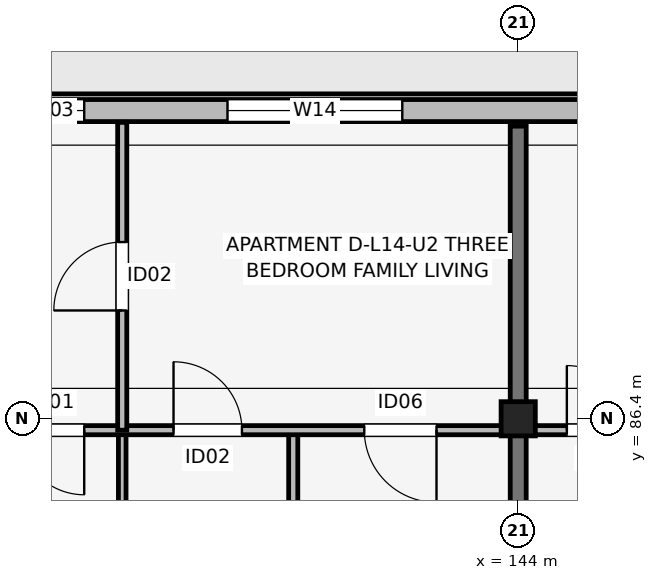
"""IFC4 building model, lengths in metres.
Left out: names, types, materials, properties, quantities, classifications, styles, units other than length and angle.
Written with IfcOpenShell. Run it as: python <this file> out.ifc"""

import sys

from ifc_helpers import new_model, si_unit, direction, frame, frame_2d, origin, origin_2d, place, context, subcontext, project, spatial, rectangle, extrude, element, fill, save


model = new_model("IFC4")
c1 = context("Model", 3, precision=1e-05, world=origin(), true_north=direction((0.0, 1.0)))
c2 = subcontext(c1, "Body", "Model", "MODEL_VIEW")
j1 = project(units=[si_unit("LENGTHUNIT", "METRE"), si_unit("PLANEANGLEUNIT", "RADIAN")], contexts=[c1])
p1 = place(None, origin())
s1 = spatial("IfcSite", under=j1, at=p1, CompositionType="ELEMENT")
p2 = place(p1, origin())
s2 = spatial("IfcBuilding", under=s1, at=p2, CompositionType="ELEMENT")
p3 = place(p2, frame((0.0, 0.0, 46.5)))
s3 = spatial("IfcBuildingStorey", under=s2, at=p3, CompositionType="ELEMENT", Elevation=46.5)
p4 = place(p3, frame((144.0, 86.4, 0.0), z_axis=(0.0, 0.0, 1.0), x_axis=(1.0, 0.0, 0.0)))
e1 = element("IfcColumn", 1, at=p4, inside=s3, PredefinedType="COLUMN", context=c2, shape_type="SweptSolid", body=[
    extrude(rectangle(XDim=0.45, YDim=0.45, at=origin_2d()), origin(), (0.0, 0.0, 1.0), 3.15),
])
p5 = place(p3, frame((144.0, 83.85, 0.0), z_axis=(0.0, 0.0, 1.0), x_axis=(0.0, 1.0, 0.0)))
e2 = element("IfcWall", 2, at=p5, inside=s3, PredefinedType="SHEAR", context=c2, shape_type="SweptSolid", body=[
    extrude(rectangle(XDim=6.4, YDim=0.21, at=frame_2d((3.2, 0.0))), origin(), (0.0, 0.0, 1.0), 3.15),
])
p6 = place(p3, frame((163.6, 90.455, 0.0), z_axis=(0.0, 0.0, 1.0), x_axis=(-1.0, 0.0, 0.0)))
e3 = element("IfcWall", 3, at=p6, inside=s3, PredefinedType="SOLIDWALL", context=c2, shape_type="SweptSolid", body=[
    extrude(rectangle(XDim=32.0, YDim=0.29, at=frame_2d((16.0, 0.0))), origin(), (0.0, 0.0, 1.0), 2.48),
])
p7 = place(p6, frame((15.45, 0.0, 0.0), z_axis=(0.0, 0.0, 1.0), x_axis=(-1.0, 0.0, 0.0)))
e4 = element("IfcOpeningElement", 4, at=p7, cuts=e3, PredefinedType="OPENING", context=c2, shape_type="SweptSolid", body=[
    extrude(rectangle(XDim=2.1, YDim=2.2, at=frame_2d((1.05, 1.1))), frame((0.0, 0.155, 0.0), z_axis=(0.0, -1.0, 0.0), x_axis=(1.0, 0.0, 0.0)), (0.0, 0.0, 1.0), 0.31),
])
p8 = place(p6, frame((29.285, 0.0, 0.7)))
e5 = element("IfcOpeningElement", 5, at=p8, cuts=e3, PredefinedType="OPENING", context=c2, shape_type="SweptSolid", body=[
    extrude(rectangle(XDim=1.86, YDim=1.6, at=frame_2d((0.93, 0.8))), frame((0.0, 0.155, 0.0), z_axis=(0.0, -1.0, 0.0), x_axis=(1.0, 0.0, 0.0)), (0.0, 0.0, 1.0), 0.31),
])
p9 = place(p6, frame((27.405, 0.0, 0.75)))
e6 = element("IfcOpeningElement", 6, at=p9, cuts=e3, PredefinedType="OPENING", context=c2, shape_type="SweptSolid", body=[
    extrude(rectangle(XDim=0.72, YDim=1.35, at=frame_2d((0.36, 0.675))), frame((0.0, 0.155, 0.0), z_axis=(0.0, -1.0, 0.0), x_axis=(1.0, 0.0, 0.0)), (0.0, 0.0, 1.0), 0.31),
])
p10 = place(p6, frame((25.31, 0.0, 0.75)))
e7 = element("IfcOpeningElement", 7, at=p10, cuts=e3, PredefinedType="OPENING", context=c2, shape_type="SweptSolid", body=[
    extrude(rectangle(XDim=0.85, YDim=1.4, at=frame_2d((0.425, 0.7))), frame((0.0, 0.155, 0.0), z_axis=(0.0, -1.0, 0.0), x_axis=(1.0, 0.0, 0.0)), (0.0, 0.0, 1.0), 0.31),
])
p11 = place(p6, frame((21.125, 0.0, 0.7)))
e8 = element("IfcOpeningElement", 8, at=p11, cuts=e3, PredefinedType="OPENING", context=c2, shape_type="SweptSolid", body=[
    extrude(rectangle(XDim=2.3, YDim=1.65, at=frame_2d((1.15, 0.825))), frame((0.0, 0.155, 0.0), z_axis=(0.0, -1.0, 0.0), x_axis=(1.0, 0.0, 0.0)), (0.0, 0.0, 1.0), 0.31),
])
p12 = place(p6, frame((16.335, 0.0, 0.7)))
e9 = element("IfcOpeningElement", 9, at=p12, cuts=e3, PredefinedType="OPENING", context=c2, shape_type="SweptSolid", body=[
    extrude(rectangle(XDim=2.45, YDim=1.65, at=frame_2d((1.225, 0.825))), frame((0.0, 0.155, 0.0), z_axis=(0.0, -1.0, 0.0), x_axis=(1.0, 0.0, 0.0)), (0.0, 0.0, 1.0), 0.31),
])
p13 = place(p6, frame((10.725, 0.0, 0.75)))
e10 = element("IfcOpeningElement", 10, at=p13, cuts=e3, PredefinedType="OPENING", context=c2, shape_type="SweptSolid", body=[
    extrude(rectangle(XDim=1.22, YDim=1.5, at=frame_2d((0.61, 0.75))), frame((0.0, 0.155, 0.0), z_axis=(0.0, -1.0, 0.0), x_axis=(1.0, 0.0, 0.0)), (0.0, 0.0, 1.0), 0.31),
])
p14 = place(p6, frame((7.015, 0.0, 0.7)))
e11 = element("IfcOpeningElement", 11, at=p14, cuts=e3, PredefinedType="OPENING", context=c2, shape_type="SweptSolid", body=[
    extrude(rectangle(XDim=1.72, YDim=1.6, at=frame_2d((0.86, 0.8))), frame((0.0, 0.155, 0.0), z_axis=(0.0, -1.0, 0.0), x_axis=(1.0, 0.0, 0.0)), (0.0, 0.0, 1.0), 0.31),
])
p15 = place(p6, frame((3.375, 0.0, 0.75)))
e12 = element("IfcOpeningElement", 12, at=p15, cuts=e3, PredefinedType="OPENING", context=c2, shape_type="SweptSolid", body=[
    extrude(rectangle(XDim=1.46, YDim=1.55, at=frame_2d((0.73, 0.775))), frame((0.0, 0.155, 0.0), z_axis=(0.0, -1.0, 0.0), x_axis=(1.0, 0.0, 0.0)), (0.0, 0.0, 1.0), 0.31),
])
p16 = place(p6, frame((1.355, 0.0, 0.75)))
e13 = element("IfcOpeningElement", 13, at=p16, cuts=e3, PredefinedType="OPENING", context=c2, shape_type="SweptSolid", body=[
    extrude(rectangle(XDim=0.6, YDim=1.25, at=frame_2d((0.3, 0.625))), frame((0.0, 0.155, 0.0), z_axis=(0.0, -1.0, 0.0), x_axis=(1.0, 0.0, 0.0)), (0.0, 0.0, 1.0), 0.31),
])
p17 = place(p3, frame((138.79, 83.7, 0.0), z_axis=(0.0, 0.0, 1.0), x_axis=(0.0, 1.0, 0.0)))
e14 = element("IfcWall", 14, at=p17, inside=s3, PredefinedType="PARTITIONING", context=c2, shape_type="SweptSolid", body=[
    extrude(rectangle(XDim=2.55, YDim=0.1, at=frame_2d((1.275, 0.0))), origin(), (0.0, 0.0, 1.0), 2.38),
])
p18 = place(p3, frame((141.04, 83.7, 0.0), z_axis=(0.0, 0.0, 1.0), x_axis=(0.0, 1.0, 0.0)))
e15 = element("IfcWall", 15, at=p18, inside=s3, PredefinedType="PARTITIONING", context=c2, shape_type="SweptSolid", body=[
    extrude(rectangle(XDim=2.55, YDim=0.12, at=frame_2d((1.275, 0.0))), origin(), (0.0, 0.0, 1.0), 2.38),
])
p19 = place(p3, frame((136.94, 86.25, 0.0), z_axis=(0.0, 0.0, 1.0), x_axis=(1.0, 0.0, 0.0)))
e16 = element("IfcWall", 16, at=p19, inside=s3, PredefinedType="PARTITIONING", context=c2, shape_type="SweptSolid", body=[
    extrude(rectangle(XDim=6.92, YDim=0.12, at=frame_2d((3.46, 0.0))), origin(), (0.0, 0.0, 1.0), 2.38),
])
p20 = place(p19, frame((1.35, 0.0, 0.0), z_axis=(0.0, 0.0, 1.0), x_axis=(-1.0, 0.0, 0.0)))
e17 = element("IfcOpeningElement", 17, at=p20, cuts=e16, PredefinedType="OPENING", context=c2, shape_type="SweptSolid", body=[
    extrude(rectangle(XDim=0.85, YDim=2.08, at=frame_2d((0.425, 1.04))), frame((0.0, 0.07, 0.0), z_axis=(0.0, -1.0, 0.0), x_axis=(1.0, 0.0, 0.0)), (0.0, 0.0, 1.0), 0.14),
])
p21 = place(p19, frame((2.525, 0.0, 0.0)))
e18 = element("IfcOpeningElement", 18, at=p21, cuts=e16, PredefinedType="OPENING", context=c2, shape_type="SweptSolid", body=[
    extrude(rectangle(XDim=0.9, YDim=2.08, at=frame_2d((0.45, 1.04))), frame((0.0, 0.07, 0.0), z_axis=(0.0, -1.0, 0.0), x_axis=(1.0, 0.0, 0.0)), (0.0, 0.0, 1.0), 0.14),
])
p22 = place(p19, frame((5.985, 0.0, 0.0), z_axis=(0.0, 0.0, 1.0), x_axis=(-1.0, 0.0, 0.0)))
e19 = element("IfcOpeningElement", 19, at=p22, cuts=e16, PredefinedType="OPENING", context=c2, shape_type="SweptSolid", body=[
    extrude(rectangle(XDim=0.95, YDim=2.08, at=frame_2d((0.475, 1.04))), frame((0.0, 0.07, 0.0), z_axis=(0.0, -1.0, 0.0), x_axis=(1.0, 0.0, 0.0)), (0.0, 0.0, 1.0), 0.14),
])
p23 = place(p3, frame((138.79, 86.25, 0.0), z_axis=(0.0, 0.0, 1.0), x_axis=(0.0, 1.0, 0.0)))
e20 = element("IfcWall", 20, at=p23, inside=s3, PredefinedType="PARTITIONING", context=c2, shape_type="SweptSolid", body=[
    extrude(rectangle(XDim=4.05, YDim=0.12, at=frame_2d((2.025, 0.0))), origin(), (0.0, 0.0, 1.0), 2.38),
])
p24 = place(p23, frame((1.575, 0.0, 0.0)))
e21 = element("IfcOpeningElement", 21, at=p24, cuts=e20, PredefinedType="OPENING", context=c2, shape_type="SweptSolid", body=[
    extrude(rectangle(XDim=0.9, YDim=2.08, at=frame_2d((0.45, 1.04))), frame((0.0, 0.07, 0.0), z_axis=(0.0, -1.0, 0.0), x_axis=(1.0, 0.0, 0.0)), (0.0, 0.0, 1.0), 0.14),
])
p25 = place(p3, frame((144.14, 86.25, 0.0), z_axis=(0.0, 0.0, 1.0), x_axis=(1.0, 0.0, 0.0)))
e22 = element("IfcWall", 22, at=p25, inside=s3, PredefinedType="PARTITIONING", context=c2, shape_type="SweptSolid", body=[
    extrude(rectangle(XDim=6.92, YDim=0.12, at=frame_2d((3.46, 0.0))), origin(), (0.0, 0.0, 1.0), 2.38),
])
p26 = place(p25, frame((0.5, 0.0, 0.0)))
e23 = element("IfcOpeningElement", 23, at=p26, cuts=e22, PredefinedType="OPENING", context=c2, shape_type="SweptSolid", body=[
    extrude(rectangle(XDim=0.85, YDim=2.08, at=frame_2d((0.425, 1.04))), frame((0.0, 0.07, 0.0), z_axis=(0.0, -1.0, 0.0), x_axis=(1.0, 0.0, 0.0)), (0.0, 0.0, 1.0), 0.14),
])
p27 = place(p25, frame((3.275, 0.0, 0.0), z_axis=(0.0, 0.0, 1.0), x_axis=(-1.0, 0.0, 0.0)))
e24 = element("IfcOpeningElement", 24, at=p27, cuts=e22, PredefinedType="OPENING", context=c2, shape_type="SweptSolid", body=[
    extrude(rectangle(XDim=0.9, YDim=2.08, at=frame_2d((0.45, 1.04))), frame((0.0, 0.07, 0.0), z_axis=(0.0, -1.0, 0.0), x_axis=(1.0, 0.0, 0.0)), (0.0, 0.0, 1.0), 0.14),
])
p28 = place(p25, frame((4.885, 0.0, 0.0)))
e25 = element("IfcOpeningElement", 25, at=p28, cuts=e22, PredefinedType="OPENING", context=c2, shape_type="SweptSolid", body=[
    extrude(rectangle(XDim=0.95, YDim=2.08, at=frame_2d((0.475, 1.04))), frame((0.0, 0.07, 0.0), z_axis=(0.0, -1.0, 0.0), x_axis=(1.0, 0.0, 0.0)), (0.0, 0.0, 1.0), 0.14),
])
p29 = place(p10, origin())
e26 = element("IfcWindow", 26, at=p29, inside=s3, PartitioningType="SINGLE_PANEL", PredefinedType="WINDOW", context=c2, shape_type="SweptSolid", body=[
    extrude(rectangle(XDim=0.85, YDim=1.4, at=frame_2d((0.425, 0.7))), frame((0.0, 0.03, 0.0), z_axis=(0.0, -1.0, 0.0), x_axis=(1.0, 0.0, 0.0)), (0.0, 0.0, 1.0), 0.06),
])
fill(e7, e26)
p30 = place(p11, origin())
e27 = element("IfcWindow", 27, at=p30, inside=s3, PartitioningType="SINGLE_PANEL", PredefinedType="WINDOW", context=c2, shape_type="SweptSolid", body=[
    extrude(rectangle(XDim=2.3, YDim=1.65, at=frame_2d((1.15, 0.825))), frame((0.0, 0.03, 0.0), z_axis=(0.0, -1.0, 0.0), x_axis=(1.0, 0.0, 0.0)), (0.0, 0.0, 1.0), 0.06),
])
fill(e8, e27)
p31 = place(p20, origin())
e28 = element("IfcDoor", 28, at=p31, inside=s3, OperationType="SINGLE_SWING_RIGHT", PredefinedType="DOOR", context=c2, shape_type="SweptSolid", body=[
    extrude(rectangle(XDim=0.85, YDim=2.08, at=frame_2d((0.425, 1.04))), frame((0.0, 0.025, 0.0), z_axis=(0.0, -1.0, 0.0), x_axis=(1.0, 0.0, 0.0)), (0.0, 0.0, 1.0), 0.05),
])
fill(e17, e28)
p32 = place(p21, origin())
e29 = element("IfcDoor", 29, at=p32, inside=s3, OperationType="SINGLE_SWING_LEFT", PredefinedType="DOOR", context=c2, shape_type="SweptSolid", body=[
    extrude(rectangle(XDim=0.9, YDim=2.08, at=frame_2d((0.45, 1.04))), frame((0.0, 0.025, 0.0), z_axis=(0.0, -1.0, 0.0), x_axis=(1.0, 0.0, 0.0)), (0.0, 0.0, 1.0), 0.05),
])
fill(e18, e29)
p33 = place(p22, origin())
e30 = element("IfcDoor", 30, at=p33, inside=s3, OperationType="SINGLE_SWING_RIGHT", PredefinedType="DOOR", context=c2, shape_type="SweptSolid", body=[
    extrude(rectangle(XDim=0.95, YDim=2.08, at=frame_2d((0.475, 1.04))), frame((0.0, 0.025, 0.0), z_axis=(0.0, -1.0, 0.0), x_axis=(1.0, 0.0, 0.0)), (0.0, 0.0, 1.0), 0.05),
])
fill(e19, e30)
p34 = place(p24, origin())
e31 = element("IfcDoor", 31, at=p34, inside=s3, OperationType="SINGLE_SWING_LEFT", PredefinedType="DOOR", context=c2, shape_type="SweptSolid", body=[
    extrude(rectangle(XDim=0.9, YDim=2.08, at=frame_2d((0.45, 1.04))), frame((0.0, 0.025, 0.0), z_axis=(0.0, -1.0, 0.0), x_axis=(1.0, 0.0, 0.0)), (0.0, 0.0, 1.0), 0.05),
])
fill(e21, e31)
p35 = place(p26, origin())
e32 = element("IfcDoor", 32, at=p35, inside=s3, OperationType="SINGLE_SWING_LEFT", PredefinedType="DOOR", context=c2, shape_type="SweptSolid", body=[
    extrude(rectangle(XDim=0.85, YDim=2.08, at=frame_2d((0.425, 1.04))), frame((0.0, 0.025, 0.0), z_axis=(0.0, -1.0, 0.0), x_axis=(1.0, 0.0, 0.0)), (0.0, 0.0, 1.0), 0.05),
])
fill(e23, e32)
save(model, sys.argv[1])
